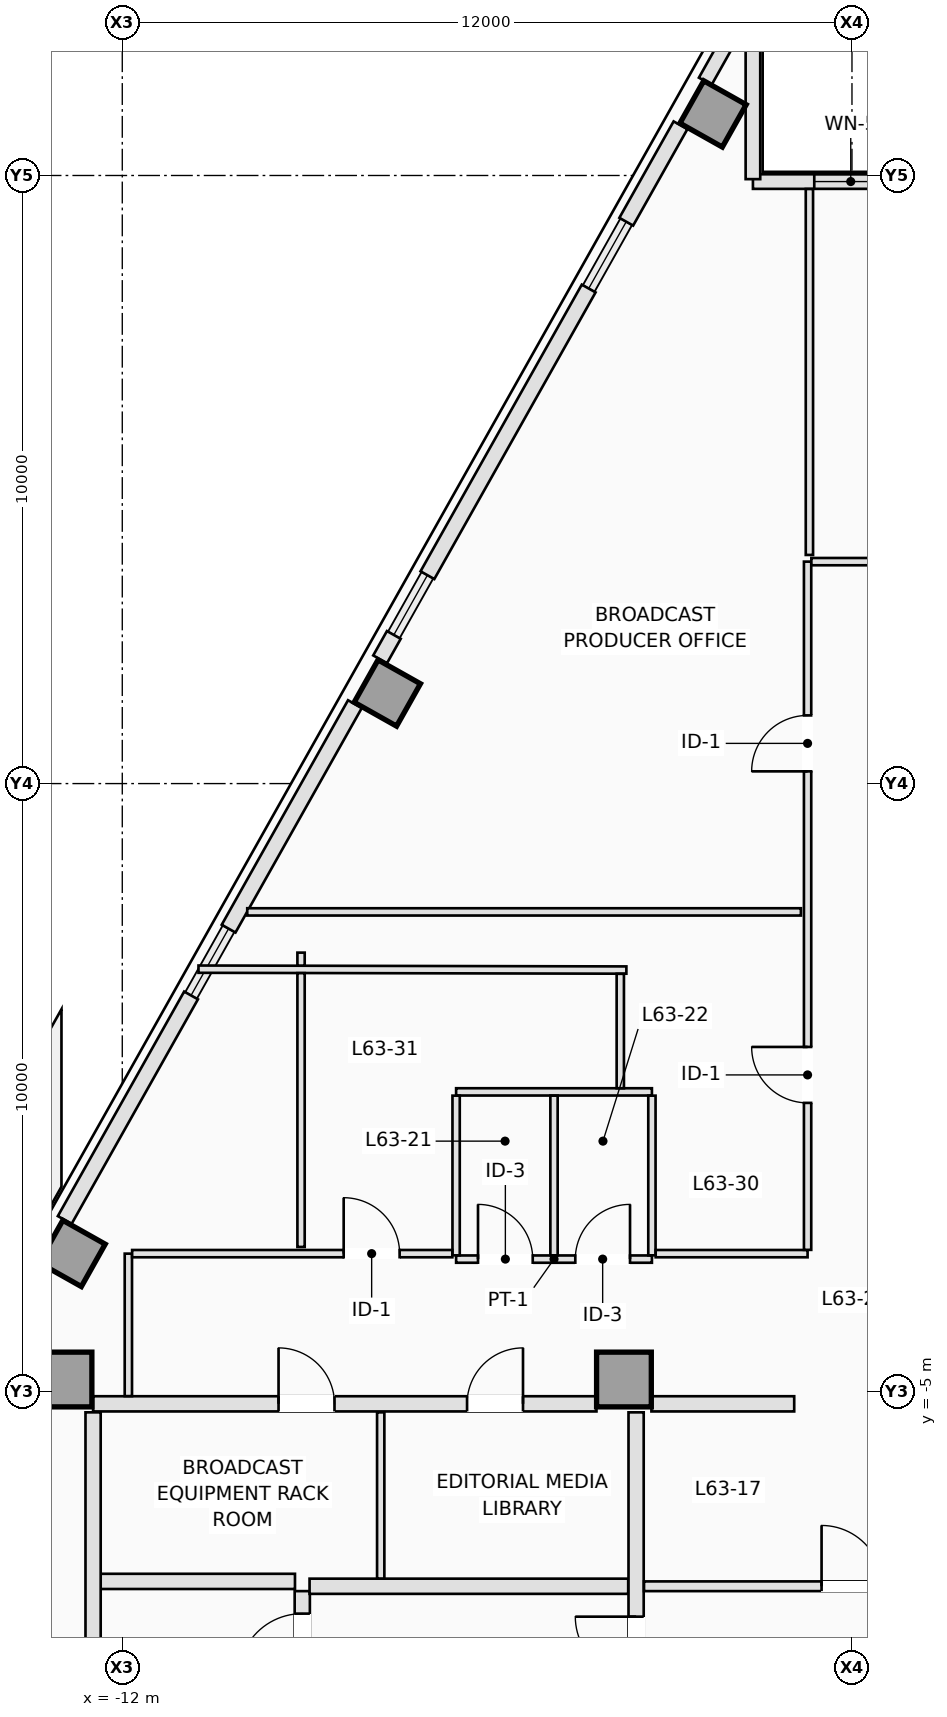
"""IFC4 building model, lengths in metres.
Left out: names, types, materials, properties, quantities, classifications, styles, units other than length and angle.
Written with IfcOpenShell. Run it as: python <this file> out.ifc"""

import sys

from ifc_helpers import new_model, si_unit, direction, frame, frame_2d, origin, origin_2d, place, context, subcontext, project, spatial, rectangle, extrude, element, fill, save


model = new_model("IFC4")
c1 = context("Model", 3, precision=1e-05, world=origin(), true_north=direction((0.0, 1.0)))
c2 = subcontext(c1, "Body", "Model", "MODEL_VIEW")
j1 = project(units=[si_unit("LENGTHUNIT", "METRE"), si_unit("PLANEANGLEUNIT", "RADIAN")], contexts=[c1])
p1 = place(None, origin())
s1 = spatial("IfcSite", under=j1, at=p1, CompositionType="ELEMENT")
p2 = place(p1, origin())
s2 = spatial("IfcBuilding", under=s1, at=p2, CompositionType="ELEMENT")
p3 = place(p2, frame((0.0, 0.0, 228.9)))
s3 = spatial("IfcBuildingStorey", under=s2, at=p3, CompositionType="ELEMENT", Elevation=228.9)
for number, where, z_axis, x_axis in (
    (1, (-12.95, -4.8, 0.0), (0.0, 0.0, 1.0), (1.0, 0.0, 0.0)),
    (2, (-3.75, -4.8, 0.0), (0.0, 0.0, 1.0), (1.0, 0.0, 0.0)),
):
    element("IfcColumn", number, at=place(p3, frame(where, z_axis=z_axis, x_axis=x_axis)), inside=s3, PredefinedType="COLUMN", context=c2, shape_type="SweptSolid", body=[
        extrude(rectangle(XDim=0.9, YDim=0.9, at=origin_2d()), origin(), (0.0, 0.0, 1.0), 3.5),
    ])
for number, where, z_axis, x_axis in (
    (3, (-2.285, 16.012, 0.0), (0.0, 0.0, 1.0), (-0.872, 0.49, 0.0)),
    (4, (-7.642, 6.489, 0.0), (0.0, 0.0, 1.0), (-0.872, 0.49, 0.0)),
    (5, (-12.825, -2.727, 0.0), (0.0, 0.0, 1.0), (-0.872, 0.49, 0.0)),
):
    element("IfcColumn", number, at=place(p3, frame(where, z_axis=z_axis, x_axis=x_axis)), inside=s3, PredefinedType="COLUMN", context=c2, shape_type="SweptSolid", body=[
        extrude(rectangle(XDim=0.8, YDim=0.8, at=origin_2d()), origin(), (0.0, 0.0, 1.0), 3.5),
    ])
p4 = place(p3, frame((-2.413, 16.549, 0.0), z_axis=(0.0, 0.0, 1.0), x_axis=(0.490199895283, 0.871610040479, 0.0)))
e6 = element("IfcWall", 6, at=p4, inside=s3, PredefinedType="STANDARD", context=c2, shape_type="SweptSolid", body=[
    extrude(rectangle(XDim=0.945, YDim=0.24, at=frame_2d((0.472, 0.0))), origin(), (0.0, 0.0, 1.0), 3.25),
])
p5 = place(p3, frame((-7.76, 7.044, 0.0), z_axis=(0.0, 0.0, 1.0), x_axis=(0.490412424957, 0.871490478116, 0.0)))
e7 = element("IfcWall", 7, at=p5, inside=s3, PredefinedType="STANDARD", context=c2, shape_type="SweptSolid", body=[
    extrude(rectangle(XDim=0.46, YDim=0.26, at=frame_2d((0.23, 0.0))), origin(), (0.0, 0.0, 1.0), 3.25),
])
p6 = place(p3, frame((-6.982, 8.427, 0.0), z_axis=(0.0, 0.0, 1.0), x_axis=(0.490265525523, 0.871573126297, 0.0)))
e8 = element("IfcWall", 8, at=p6, inside=s3, PredefinedType="STANDARD", context=c2, shape_type="SweptSolid", body=[
    extrude(rectangle(XDim=5.409, YDim=0.26, at=frame_2d((2.705, 0.0))), origin(), (0.0, 0.0, 1.0), 3.25),
])
p7 = place(p3, frame((-3.712, 14.24, 0.0), z_axis=(0.0, 0.0, 1.0), x_axis=(0.490261239633, 0.871575537125, 0.0)))
e9 = element("IfcWall", 9, at=p7, inside=s3, PredefinedType="STANDARD", context=c2, shape_type="SweptSolid", body=[
    extrude(rectangle(XDim=1.82, YDim=0.26, at=frame_2d((0.91, 0.0))), origin(), (0.0, 0.0, 1.0), 3.25),
])
p8 = place(p3, frame((-12.946, -2.177, 0.0), z_axis=(0.0, 0.0, 1.0), x_axis=(0.490244825075, 0.871584770109, 0.0)))
e10 = element("IfcWall", 10, at=p8, inside=s3, PredefinedType="STANDARD", context=c2, shape_type="SweptSolid", body=[
    extrude(rectangle(XDim=4.237, YDim=0.26, at=frame_2d((2.119, 0.0))), origin(), (0.0, 0.0, 1.0), 3.25),
])
p9 = place(p3, frame((-10.251, 2.615, 0.0), z_axis=(0.0, 0.0, 1.0), x_axis=(0.490269447258, 0.871570920284, 0.0)))
e11 = element("IfcWall", 11, at=p9, inside=s3, PredefinedType="STANDARD", context=c2, shape_type="SweptSolid", body=[
    extrude(rectangle(XDim=4.237, YDim=0.26, at=frame_2d((2.118, 0.0))), origin(), (0.0, 0.0, 1.0), 3.25),
])
p10 = place(p3, frame((1.589, 14.9, 0.0), z_axis=(0.0, 0.0, 1.0), x_axis=(-1.0, 0.0, 0.0)))
e12 = element("IfcWall", 12, at=p10, inside=s3, PredefinedType="STANDARD", context=c2, shape_type="SweptSolid", body=[
    extrude(rectangle(XDim=3.218, YDim=0.24, at=frame_2d((1.609, 0.0))), origin(), (0.0, 0.0, 1.0), 3.25),
])
p11 = place(p10, frame((1.009, 0.0, 0.9)))
e13 = element("IfcOpeningElement", 13, at=p11, cuts=e12, PredefinedType="OPENING", context=c2, shape_type="SweptSolid", body=[
    extrude(rectangle(XDim=1.2, YDim=1.8, at=frame_2d((0.6, 0.9))), frame((0.0, 0.13, 0.0), z_axis=(0.0, -1.0, 0.0), x_axis=(1.0, 0.0, 0.0)), (0.0, 0.0, 1.0), 0.26),
])
p12 = place(p3, frame((-1.629, 14.94, 0.0), z_axis=(0.0, 0.0, 1.0), x_axis=(0.0, 1.0, 0.0)))
e14 = element("IfcWall", 14, at=p12, inside=s3, PredefinedType="STANDARD", context=c2, shape_type="SweptSolid", body=[
    extrude(rectangle(XDim=2.46, YDim=0.24, at=frame_2d((1.23, 0.0))), origin(), (0.0, 0.0, 1.0), 3.25),
])
p13 = place(p3, frame((-9.04, -10.18, 0.0), z_axis=(0.0, 0.0, 1.0), x_axis=(0.0, 1.0, 0.0)))
e15 = element("IfcWall", 15, at=p13, inside=s3, PredefinedType="PARTITIONING", context=c2, shape_type="SweptSolid", body=[
    extrude(rectangle(XDim=1.9, YDim=0.25, at=frame_2d((0.95, 0.0))), origin(), (0.0, 0.0, 1.0), 3.25),
])
p14 = place(p13, frame((0.48, 0.0, 0.0)))
e16 = element("IfcOpeningElement", 16, at=p14, cuts=e15, PredefinedType="OPENING", context=c2, shape_type="SweptSolid", body=[
    extrude(rectangle(XDim=1.05, YDim=2.15, at=frame_2d((0.525, 1.075))), frame((0.0, 0.135, 0.0), z_axis=(0.0, -1.0, 0.0), x_axis=(1.0, 0.0, 0.0)), (0.0, 0.0, 1.0), 0.27),
])
p15 = place(p3, frame((-12.38, -8.12, 0.0), z_axis=(0.0, 0.0, 1.0), x_axis=(1.0, 0.0, 0.0)))
e17 = element("IfcWall", 17, at=p15, inside=s3, PredefinedType="PARTITIONING", context=c2, shape_type="SweptSolid", body=[
    extrude(rectangle(XDim=3.22, YDim=0.25, at=frame_2d((1.61, 0.0))), origin(), (0.0, 0.0, 1.0), 3.25),
])
p16 = place(p3, frame((-12.48, -10.18, 0.0), z_axis=(0.0, 0.0, 1.0), x_axis=(0.0, 1.0, 0.0)))
e18 = element("IfcWall", 18, at=p16, inside=s3, PredefinedType="PARTITIONING", context=c2, shape_type="SweptSolid", body=[
    extrude(rectangle(XDim=4.84, YDim=0.25, at=frame_2d((2.42, 0.0))), origin(), (0.0, 0.0, 1.0), 3.25),
])
p17 = place(p3, frame((-8.92, -8.2, 0.0), z_axis=(0.0, 0.0, 1.0), x_axis=(1.0, 0.0, 0.0)))
e19 = element("IfcWall", 19, at=p17, inside=s3, PredefinedType="PARTITIONING", context=c2, shape_type="SweptSolid", body=[
    extrude(rectangle(XDim=5.24, YDim=0.25, at=frame_2d((2.62, 0.0))), origin(), (0.0, 0.0, 1.0), 3.25),
])
p18 = place(p3, frame((-3.55, -15.898, 0.0), z_axis=(0.0, 0.0, 1.0), x_axis=(0.0, 1.0, 0.0)))
e20 = element("IfcWall", 20, at=p18, inside=s3, PredefinedType="PARTITIONING", context=c2, shape_type="SweptSolid", body=[
    extrude(rectangle(XDim=10.558, YDim=0.25, at=frame_2d((5.279, 0.0))), origin(), (0.0, 0.0, 1.0), 3.25),
])
p19 = place(p18, frame((6.198, 0.0, 0.0)))
e21 = element("IfcOpeningElement", 21, at=p19, cuts=e20, PredefinedType="OPENING", context=c2, shape_type="SweptSolid", body=[
    extrude(rectangle(XDim=1.0, YDim=2.15, at=frame_2d((0.5, 1.075))), frame((0.0, 0.135, 0.0), z_axis=(0.0, -1.0, 0.0), x_axis=(1.0, 0.0, 0.0)), (0.0, 0.0, 1.0), 0.27),
])
p20 = place(p3, frame((-12.48, -5.2, 0.0), z_axis=(0.0, 0.0, 1.0), x_axis=(1.0, 0.0, 0.0)))
e22 = element("IfcWall", 22, at=p20, inside=s3, PredefinedType="PARTITIONING", context=c2, shape_type="SweptSolid", body=[
    extrude(rectangle(XDim=8.278, YDim=0.25, at=frame_2d((4.139, 0.0))), origin(), (0.0, 0.0, 1.0), 3.25),
])
p21 = place(p20, frame((3.05, 0.0, 0.0)))
e23 = element("IfcOpeningElement", 23, at=p21, cuts=e22, PredefinedType="OPENING", context=c2, shape_type="SweptSolid", body=[
    extrude(rectangle(XDim=0.92, YDim=2.12, at=frame_2d((0.46, 1.06))), frame((0.0, 0.135, 0.0), z_axis=(0.0, -1.0, 0.0), x_axis=(1.0, 0.0, 0.0)), (0.0, 0.0, 1.0), 0.27),
])
p22 = place(p20, frame((6.15, 0.0, 0.0)))
e24 = element("IfcOpeningElement", 24, at=p22, cuts=e22, PredefinedType="OPENING", context=c2, shape_type="SweptSolid", body=[
    extrude(rectangle(XDim=0.92, YDim=2.12, at=frame_2d((0.46, 1.06))), frame((0.0, 0.135, 0.0), z_axis=(0.0, -1.0, 0.0), x_axis=(1.0, 0.0, 0.0)), (0.0, 0.0, 1.0), 0.27),
])
p23 = place(p3, frame((-3.298, -5.2, 0.0), z_axis=(0.0, 0.0, 1.0), x_axis=(1.0, 0.0, 0.0)))
e25 = element("IfcWall", 25, at=p23, inside=s3, PredefinedType="PARTITIONING", context=c2, shape_type="SweptSolid", body=[
    extrude(rectangle(XDim=2.348, YDim=0.25, at=frame_2d((1.174, 0.0))), origin(), (0.0, 0.0, 1.0), 3.25),
])
p24 = place(p3, frame((-7.75, -8.073, 0.0), z_axis=(0.0, 0.0, 1.0), x_axis=(0.0, 1.0, 0.0)))
e26 = element("IfcWall", 26, at=p24, inside=s3, PredefinedType="PARTITIONING", context=c2, shape_type="SweptSolid", body=[
    extrude(rectangle(XDim=2.733, YDim=0.12, at=frame_2d((1.366, 0.0))), origin(), (0.0, 0.0, 1.0), 3.25),
])
p25 = place(p3, frame((-3.42, -8.2, 0.0), z_axis=(0.0, 0.0, 1.0), x_axis=(1.0, 0.0, 0.0)))
e27 = element("IfcWall", 27, at=p25, inside=s3, PredefinedType="PARTITIONING", context=c2, shape_type="SweptSolid", body=[
    extrude(rectangle(XDim=6.84, YDim=0.16, at=frame_2d((3.42, 0.0))), origin(), (0.0, 0.0, 1.0), 3.25),
])
p26 = place(p25, frame((2.92, 0.0, 0.0)))
e28 = element("IfcOpeningElement", 28, at=p26, cuts=e27, PredefinedType="OPENING", context=c2, shape_type="SweptSolid", body=[
    extrude(rectangle(XDim=1.0, YDim=2.15, at=frame_2d((0.5, 1.075))), frame((0.0, 0.09, 0.0), z_axis=(0.0, -1.0, 0.0), x_axis=(1.0, 0.0, 0.0)), (0.0, 0.0, 1.0), 0.18),
])
p27 = place(p3, frame((-6.51, -2.82, 0.0), z_axis=(0.0, 0.0, 1.0), x_axis=(1.0, 0.0, 0.0)))
e29 = element("IfcWall", 29, at=p27, inside=s3, PredefinedType="PARTITIONING", context=c2, shape_type="SweptSolid", body=[
    extrude(rectangle(XDim=3.22, YDim=0.12, at=frame_2d((1.61, 0.0))), origin(), (0.0, 0.0, 1.0), 2.943),
])
p28 = place(p27, frame((0.36, 0.0, 0.0)))
e30 = element("IfcOpeningElement", 30, at=p28, cuts=e29, PredefinedType="OPENING", context=c2, shape_type="SweptSolid", body=[
    extrude(rectangle(XDim=0.9, YDim=2.12, at=frame_2d((0.45, 1.06))), frame((0.0, 0.07, 0.0), z_axis=(0.0, -1.0, 0.0), x_axis=(1.0, 0.0, 0.0)), (0.0, 0.0, 1.0), 0.14),
])
p29 = place(p27, frame((1.96, 0.0, 0.0)))
e31 = element("IfcOpeningElement", 31, at=p29, cuts=e29, PredefinedType="OPENING", context=c2, shape_type="SweptSolid", body=[
    extrude(rectangle(XDim=0.9, YDim=2.12, at=frame_2d((0.45, 1.06))), frame((0.0, 0.07, 0.0), z_axis=(0.0, -1.0, 0.0), x_axis=(1.0, 0.0, 0.0)), (0.0, 0.0, 1.0), 0.14),
])
p30 = place(p3, frame((-6.51, -0.07, 0.0), z_axis=(0.0, 0.0, 1.0), x_axis=(1.0, 0.0, 0.0)))
e32 = element("IfcWall", 32, at=p30, inside=s3, PredefinedType="PARTITIONING", context=c2, shape_type="SweptSolid", body=[
    extrude(rectangle(XDim=3.22, YDim=0.12, at=frame_2d((1.61, 0.0))), origin(), (0.0, 0.0, 1.0), 3.25),
])
for number, where, z_axis, x_axis in (
    (33, (-6.51, -2.758, 0.0), (0.0, 0.0, 1.0), (0.0, 1.0, 0.0)),
    (34, (-4.9, -2.758, 0.0), (0.0, 0.0, 1.0), (0.0, 1.0, 0.0)),
):
    element("IfcWall", number, at=place(p3, frame(where, z_axis=z_axis, x_axis=x_axis)), inside=s3, PredefinedType="PARTITIONING", context=c2, shape_type="SweptSolid", body=[
        extrude(rectangle(XDim=2.626, YDim=0.12, at=frame_2d((1.313, 0.0))), origin(), (0.0, 0.0, 1.0), 3.25),
    ])
p31 = place(p3, frame((-3.29, -2.758, 0.0), z_axis=(0.0, 0.0, 1.0), x_axis=(0.0, 1.0, 0.0)))
e35 = element("IfcWall", 35, at=p31, inside=s3, PredefinedType="PARTITIONING", context=c2, shape_type="SweptSolid", body=[
    extrude(rectangle(XDim=2.626, YDim=0.12, at=frame_2d((1.313, 0.0))), origin(), (0.0, 0.0, 1.0), 2.79),
])
p32 = place(p3, frame((-11.9, -5.073, 0.0), z_axis=(0.0, 0.0, 1.0), x_axis=(0.0, 1.0, 0.0)))
e36 = element("IfcWall", 36, at=p32, inside=s3, PredefinedType="PARTITIONING", context=c2, shape_type="SweptSolid", body=[
    extrude(rectangle(XDim=2.343, YDim=0.12, at=frame_2d((1.171, 0.0))), origin(), (0.0, 0.0, 1.0), 3.25),
])
p33 = place(p3, frame((-11.838, -2.73, 0.0), z_axis=(0.0, 0.0, 1.0), x_axis=(1.0, 0.0, 0.0)))
e37 = element("IfcWall", 37, at=p33, inside=s3, PredefinedType="PARTITIONING", context=c2, shape_type="SweptSolid", body=[
    extrude(rectangle(XDim=5.266, YDim=0.12, at=frame_2d((2.633, 0.0))), origin(), (0.0, 0.0, 1.0), 3.25),
])
p34 = place(p33, frame((3.479, 0.0, 0.0)))
e38 = element("IfcOpeningElement", 38, at=p34, cuts=e37, PredefinedType="OPENING", context=c2, shape_type="SweptSolid", body=[
    extrude(rectangle(XDim=0.92, YDim=2.12, at=frame_2d((0.46, 1.06))), frame((0.0, 0.07, 0.0), z_axis=(0.0, -1.0, 0.0), x_axis=(1.0, 0.0, 0.0)), (0.0, 0.0, 1.0), 0.14),
])
p35 = place(p3, frame((-3.228, -2.73, 0.0), z_axis=(0.0, 0.0, 1.0), x_axis=(1.0, 0.0, 0.0)))
e39 = element("IfcWall", 39, at=p35, inside=s3, PredefinedType="PARTITIONING", context=c2, shape_type="SweptSolid", body=[
    extrude(rectangle(XDim=2.498, YDim=0.12, at=frame_2d((1.249, 0.0))), origin(), (0.0, 0.0, 1.0), 2.943),
])
p36 = place(p3, frame((-0.73, -2.668, 0.0), z_axis=(0.0, 0.0, 1.0), x_axis=(0.0, 1.0, 0.0)))
e40 = element("IfcWall", 40, at=p36, inside=s3, PredefinedType="PARTITIONING", context=c2, shape_type="SweptSolid", body=[
    extrude(rectangle(XDim=11.318, YDim=0.12, at=frame_2d((5.659, 0.0))), origin(), (0.0, 0.0, 1.0), 3.25),
])
p37 = place(p36, frame((7.869, 0.0, 0.0)))
e41 = element("IfcOpeningElement", 41, at=p37, cuts=e40, PredefinedType="OPENING", context=c2, shape_type="SweptSolid", body=[
    extrude(rectangle(XDim=0.92, YDim=2.12, at=frame_2d((0.46, 1.06))), frame((0.0, 0.07, 0.0), z_axis=(0.0, -1.0, 0.0), x_axis=(1.0, 0.0, 0.0)), (0.0, 0.0, 1.0), 0.14),
])
p38 = place(p36, frame((2.417, 0.0, 0.0)))
e42 = element("IfcOpeningElement", 42, at=p38, cuts=e40, PredefinedType="OPENING", context=c2, shape_type="SweptSolid", body=[
    extrude(rectangle(XDim=0.92, YDim=2.12, at=frame_2d((0.46, 1.06))), frame((0.0, 0.07, 0.0), z_axis=(0.0, -1.0, 0.0), x_axis=(1.0, 0.0, 0.0)), (0.0, 0.0, 1.0), 0.14),
])
p39 = place(p3, frame((-0.668, 8.65, 0.0), z_axis=(0.0, 0.0, 1.0), x_axis=(1.0, 0.0, 0.0)))
e43 = element("IfcWall", 43, at=p39, inside=s3, PredefinedType="PARTITIONING", context=c2, shape_type="SweptSolid", body=[
    extrude(rectangle(XDim=1.398, YDim=0.12, at=frame_2d((0.699, 0.0))), origin(), (0.0, 0.0, 1.0), 3.25),
])
p40 = place(p3, frame((-0.7, 8.76, 0.0), z_axis=(0.0, 0.0, 1.0), x_axis=(0.0, 1.0, 0.0)))
e44 = element("IfcWall", 44, at=p40, inside=s3, PredefinedType="PARTITIONING", context=c2, shape_type="SweptSolid", body=[
    extrude(rectangle(XDim=6.018, YDim=0.12, at=frame_2d((3.009, 0.0))), origin(), (0.0, 0.0, 1.0), 3.25),
])
p41 = place(p3, frame((-0.84, 2.89, 0.0), z_axis=(0.0, 0.0, 1.0), x_axis=(-1.0, 0.0, 0.0)))
e45 = element("IfcWall", 45, at=p41, inside=s3, PredefinedType="PARTITIONING", context=c2, shape_type="SweptSolid", body=[
    extrude(rectangle(XDim=9.105, YDim=0.12, at=frame_2d((4.552, 0.0))), origin(), (0.0, 0.0, 1.0), 2.943),
])
p42 = place(p3, frame((-3.71, 1.933, 0.0), z_axis=(0.0, 0.0, 1.0), x_axis=(-0.99999783318, 0.002081738602, 0.0)))
e46 = element("IfcWall", 46, at=p42, inside=s3, PredefinedType="PARTITIONING", context=c2, shape_type="SweptSolid", body=[
    extrude(rectangle(XDim=7.037, YDim=0.12, at=frame_2d((3.518, 0.0))), origin(), (0.0, 0.0, 1.0), 2.943),
])
p43 = place(p3, frame((-3.81, -0.01, 0.0), z_axis=(0.0, 0.0, 1.0), x_axis=(0.0, 1.0, 0.0)))
e47 = element("IfcWall", 47, at=p43, inside=s3, PredefinedType="PARTITIONING", context=c2, shape_type="SweptSolid", body=[
    extrude(rectangle(XDim=1.882, YDim=0.12, at=frame_2d((0.941, 0.0))), origin(), (0.0, 0.0, 1.0), 3.25),
])
p44 = place(p3, frame((-9.06, -2.62, 0.0), z_axis=(0.0, 0.0, 1.0), x_axis=(0.0, 1.0, 0.0)))
e48 = element("IfcWall", 48, at=p44, inside=s3, PredefinedType="PARTITIONING", context=c2, shape_type="SweptSolid", body=[
    extrude(rectangle(XDim=4.503, YDim=0.12, at=frame_2d((2.251, 0.0))), origin(), (0.0, 0.0, 1.0), 3.25),
])
p45 = place(p3, frame((-9.06, 2.007, 0.0), z_axis=(0.0, 0.0, 1.0), x_axis=(0.0, 1.0, 0.0)))
e49 = element("IfcWall", 49, at=p45, inside=s3, PredefinedType="PARTITIONING", context=c2, shape_type="SweptSolid", body=[
    extrude(rectangle(XDim=0.213, YDim=0.12, at=frame_2d((0.107, 0.0))), origin(), (0.0, 0.0, 1.0), 3.25),
])
p46 = place(p11, origin())
e50 = element("IfcWindow", 50, at=p46, inside=s3, PartitioningType="SINGLE_PANEL", PredefinedType="WINDOW", context=c2, shape_type="SweptSolid", body=[
    extrude(rectangle(XDim=1.2, YDim=1.8, at=frame_2d((0.6, 0.9))), frame((0.0, 0.03, 0.0), z_axis=(0.0, -1.0, 0.0), x_axis=(1.0, 0.0, 0.0)), (0.0, 0.0, 1.0), 0.06),
])
fill(e13, e50)
p47 = place(p14, origin())
e51 = element("IfcDoor", 51, at=p47, inside=s3, OperationType="SINGLE_SWING_LEFT", PredefinedType="DOOR", context=c2, shape_type="SweptSolid", body=[
    extrude(rectangle(XDim=1.05, YDim=2.15, at=frame_2d((0.525, 1.075))), frame((0.0, 0.025, 0.0), z_axis=(0.0, -1.0, 0.0), x_axis=(1.0, 0.0, 0.0)), (0.0, 0.0, 1.0), 0.05),
])
fill(e16, e51)
p48 = place(p19, origin())
e52 = element("IfcDoor", 52, at=p48, inside=s3, OperationType="SINGLE_SWING_RIGHT", PredefinedType="DOOR", context=c2, shape_type="SweptSolid", body=[
    extrude(rectangle(XDim=1.0, YDim=2.15, at=frame_2d((0.5, 1.075))), frame((0.0, 0.025, 0.0), z_axis=(0.0, -1.0, 0.0), x_axis=(1.0, 0.0, 0.0)), (0.0, 0.0, 1.0), 0.05),
])
fill(e21, e52)
p49 = place(p21, origin())
e53 = element("IfcDoor", 53, at=p49, inside=s3, OperationType="SINGLE_SWING_LEFT", PredefinedType="DOOR", context=c2, shape_type="SweptSolid", body=[
    extrude(rectangle(XDim=0.92, YDim=2.12, at=frame_2d((0.46, 1.06))), frame((0.0, 0.025, 0.0), z_axis=(0.0, -1.0, 0.0), x_axis=(1.0, 0.0, 0.0)), (0.0, 0.0, 1.0), 0.05),
])
fill(e23, e53)
p50 = place(p22, origin())
e54 = element("IfcDoor", 54, at=p50, inside=s3, OperationType="SINGLE_SWING_RIGHT", PredefinedType="DOOR", context=c2, shape_type="SweptSolid", body=[
    extrude(rectangle(XDim=0.92, YDim=2.12, at=frame_2d((0.46, 1.06))), frame((0.0, 0.025, 0.0), z_axis=(0.0, -1.0, 0.0), x_axis=(1.0, 0.0, 0.0)), (0.0, 0.0, 1.0), 0.05),
])
fill(e24, e54)
p51 = place(p26, origin())
e55 = element("IfcDoor", 55, at=p51, inside=s3, OperationType="SINGLE_SWING_LEFT", PredefinedType="DOOR", context=c2, shape_type="SweptSolid", body=[
    extrude(rectangle(XDim=1.0, YDim=2.15, at=frame_2d((0.5, 1.075))), frame((0.0, 0.025, 0.0), z_axis=(0.0, -1.0, 0.0), x_axis=(1.0, 0.0, 0.0)), (0.0, 0.0, 1.0), 0.05),
])
fill(e28, e55)
p52 = place(p28, origin())
e56 = element("IfcDoor", 56, at=p52, inside=s3, OperationType="SINGLE_SWING_LEFT", PredefinedType="DOOR", context=c2, shape_type="SweptSolid", body=[
    extrude(rectangle(XDim=0.9, YDim=2.12, at=frame_2d((0.45, 1.06))), frame((0.0, 0.025, 0.0), z_axis=(0.0, -1.0, 0.0), x_axis=(1.0, 0.0, 0.0)), (0.0, 0.0, 1.0), 0.05),
])
fill(e30, e56)
p53 = place(p29, origin())
e57 = element("IfcDoor", 57, at=p53, inside=s3, OperationType="SINGLE_SWING_RIGHT", PredefinedType="DOOR", context=c2, shape_type="SweptSolid", body=[
    extrude(rectangle(XDim=0.9, YDim=2.12, at=frame_2d((0.45, 1.06))), frame((0.0, 0.025, 0.0), z_axis=(0.0, -1.0, 0.0), x_axis=(1.0, 0.0, 0.0)), (0.0, 0.0, 1.0), 0.05),
])
fill(e31, e57)
p54 = place(p37, origin())
e58 = element("IfcDoor", 58, at=p54, inside=s3, OperationType="SINGLE_SWING_LEFT", PredefinedType="DOOR", context=c2, shape_type="SweptSolid", body=[
    extrude(rectangle(XDim=0.92, YDim=2.12, at=frame_2d((0.46, 1.06))), frame((0.0, 0.025, 0.0), z_axis=(0.0, -1.0, 0.0), x_axis=(1.0, 0.0, 0.0)), (0.0, 0.0, 1.0), 0.05),
])
fill(e41, e58)
p55 = place(p38, origin())
e59 = element("IfcDoor", 59, at=p55, inside=s3, OperationType="SINGLE_SWING_RIGHT", PredefinedType="DOOR", context=c2, shape_type="SweptSolid", body=[
    extrude(rectangle(XDim=0.92, YDim=2.12, at=frame_2d((0.46, 1.06))), frame((0.0, 0.025, 0.0), z_axis=(0.0, -1.0, 0.0), x_axis=(1.0, 0.0, 0.0)), (0.0, 0.0, 1.0), 0.05),
])
fill(e42, e59)
p56 = place(p34, origin())
e60 = element("IfcDoor", 60, at=p56, inside=s3, OperationType="SINGLE_SWING_LEFT", PredefinedType="DOOR", context=c2, shape_type="SweptSolid", body=[
    extrude(rectangle(XDim=0.92, YDim=2.12, at=frame_2d((0.46, 1.06))), frame((0.0, 0.025, 0.0), z_axis=(0.0, -1.0, 0.0), x_axis=(1.0, 0.0, 0.0)), (0.0, 0.0, 1.0), 0.05),
])
fill(e38, e60)
save(model, sys.argv[1])
